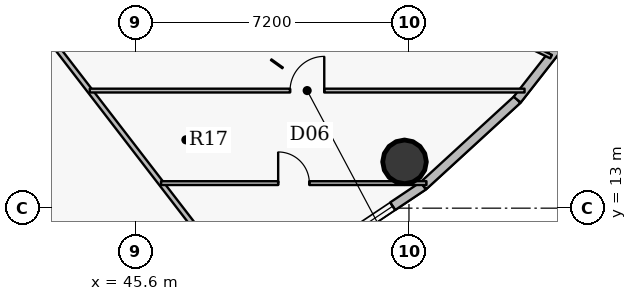
"""IFC4 building model, lengths in metres.
Left out: names, types, materials, properties, quantities, classifications, styles, units other than length and angle.
Written with IfcOpenShell. Run it as: python <this file> out.ifc"""

import sys

from ifc_helpers import new_model, si_unit, direction, frame, frame_2d, origin, origin_2d, place, context, subcontext, project, spatial, rectangle, hollow_circle, extrude, source, transform, mapped, element, fill, save


model = new_model("IFC4")
c1 = context("Model", 3, precision=1e-05, world=origin(), true_north=direction((0.0, 1.0)))
c2 = subcontext(c1, "Body", "Model", "MODEL_VIEW")
j1 = project(units=[si_unit("LENGTHUNIT", "METRE"), si_unit("PLANEANGLEUNIT", "RADIAN")], contexts=[c1])
p1 = place(None, origin())
s1 = spatial("IfcSite", under=j1, at=p1, CompositionType="ELEMENT")
p2 = place(p1, origin())
s2 = spatial("IfcBuilding", under=s1, at=p2, CompositionType="ELEMENT")
p3 = place(p2, frame((0.0, 0.0, 229.05)))
s3 = spatial("IfcBuildingStorey", under=s2, at=p3, CompositionType="ELEMENT", Elevation=229.05)
p4 = place(p3, frame((52.683, 14.219, 0.0), z_axis=(0.0, 0.0, 1.0), x_axis=(1.0, 0.0, 0.0)))
e1 = element("IfcColumn", 1, at=p4, inside=s3, PredefinedType="COLUMN", context=c2, shape_type="SweptSolid", body=[
    extrude(hollow_circle(Radius=0.575, WallThickness=0.036, at=origin_2d()), origin(), (0.0, 0.0, 1.0), 3.75),
])
p5 = place(p3, frame((53.176, 13.589, 0.0), z_axis=(0.0, 0.0, 1.0), x_axis=(-0.831262496074, -0.555880079352, 0.0)))
e2 = element("IfcWall", 2, at=p5, inside=s3, PredefinedType="SOLIDWALL", context=c2, shape_type="SweptSolid", body=[
    extrude(rectangle(XDim=3.484, YDim=0.24, at=frame_2d((1.742, 0.0))), origin(), (0.0, 0.0, 1.0), 3.5),
])
p6 = place(p5, frame((0.968, 0.0, 0.9)))
e3 = element("IfcOpeningElement", 3, at=p6, cuts=e2, PredefinedType="OPENING", context=c2, shape_type="SweptSolid", body=[
    extrude(rectangle(XDim=1.6, YDim=1.75, at=origin_2d()), frame((0.8, 0.13, 0.875), z_axis=(0.0, -1.0, 0.0), x_axis=(1.0, 0.0, 0.0)), (0.0, 0.0, 1.0), 0.26),
])
p7 = place(p3, frame((55.648, 15.855, 0.0), z_axis=(0.0, 0.0, 1.0), x_axis=(-0.737123922599, -0.675757591694, 0.0)))
e4 = element("IfcWall", 4, at=p7, inside=s3, PredefinedType="SOLIDWALL", context=c2, shape_type="SweptSolid", body=[
    extrude(rectangle(XDim=3.354, YDim=0.24, at=frame_2d((1.677, 0.0))), origin(), (0.0, 0.0, 1.0), 3.5),
])
p8 = place(p3, frame((57.636, 18.395, 0.0), z_axis=(0.0, 0.0, 1.0), x_axis=(-0.616312344705, -0.787501805562, 0.0)))
e5 = element("IfcWall", 5, at=p8, inside=s3, PredefinedType="SOLIDWALL", context=c2, shape_type="SweptSolid", body=[
    extrude(rectangle(XDim=3.225, YDim=0.24, at=frame_2d((1.612, 0.0))), origin(), (0.0, 0.0, 1.0), 3.5),
])
p9 = place(p3, frame((42.817, 18.15, 0.0), z_axis=(0.0, 0.0, 1.0), x_axis=(0.610231128601, -0.792223434194, 0.0)))
e6 = element("IfcWall", 6, at=p9, inside=s3, PredefinedType="PARTITIONING", context=c2, shape_type="SweptSolid", body=[
    extrude(rectangle(XDim=9.294, YDim=0.135, at=frame_2d((4.647, 0.0))), origin(), (0.0, 0.0, 1.0), 2.985),
])
p10 = place(p3, frame((44.401, 16.094, 0.0), z_axis=(0.0, 0.0, 1.0), x_axis=(1.0, 0.0, 0.0)))
e7 = element("IfcWall", 7, at=p10, inside=s3, PredefinedType="PARTITIONING", context=c2, shape_type="SweptSolid", body=[
    extrude(rectangle(XDim=11.441, YDim=0.1, at=frame_2d((5.72, 0.0))), origin(), (0.0, 0.0, 1.0), 2.935),
])
p11 = place(p10, frame((5.271, 0.0, 0.0)))
e8 = element("IfcOpeningElement", 8, at=p11, cuts=e7, PredefinedType="OPENING", context=c2, shape_type="SweptSolid", body=[
    extrude(rectangle(XDim=0.9, YDim=2.1, at=origin_2d()), frame((0.45, 0.06, 1.05), z_axis=(0.0, -1.0, 0.0), x_axis=(1.0, 0.0, 0.0)), (0.0, 0.0, 1.0), 0.12),
])
p12 = place(p3, frame((46.276, 13.659, 0.0), z_axis=(0.0, 0.0, 1.0), x_axis=(1.0, 0.0, 0.0)))
e9 = element("IfcWall", 9, at=p12, inside=s3, PredefinedType="PARTITIONING", context=c2, shape_type="SweptSolid", body=[
    extrude(rectangle(XDim=6.984, YDim=0.1, at=frame_2d((3.492, 0.0))), origin(), (0.0, 0.0, 1.0), 2.985),
])
p13 = place(p12, frame((3.082, 0.0, 0.0)))
e10 = element("IfcOpeningElement", 10, at=p13, cuts=e9, PredefinedType="OPENING", context=c2, shape_type="SweptSolid", body=[
    extrude(rectangle(XDim=0.82, YDim=2.1, at=origin_2d()), frame((0.41, 0.06, 1.05), z_axis=(0.0, -1.0, 0.0), x_axis=(1.0, 0.0, 0.0)), (0.0, 0.0, 1.0), 0.12),
])
p14 = place(p3, frame((50.374, 19.993, 0.0), z_axis=(0.0, 0.0, 1.0), x_axis=(0.898866241562, -0.438223093618, 0.0)))
e11 = element("IfcWall", 11, at=p14, inside=s3, PredefinedType="PARTITIONING", context=c2, shape_type="SweptSolid", body=[
    extrude(rectangle(XDim=6.86, YDim=0.1, at=frame_2d((3.43, 0.0))), origin(), (0.0, 0.0, 1.0), 2.985),
])
p15 = place(p14, frame((2.98, 0.0, 0.0)))
e12 = element("IfcOpeningElement", 12, at=p15, cuts=e11, PredefinedType="OPENING", context=c2, shape_type="SweptSolid", body=[
    extrude(rectangle(XDim=0.9, YDim=2.1, at=origin_2d()), frame((0.45, 0.06, 1.05), z_axis=(0.0, -1.0, 0.0), x_axis=(1.0, 0.0, 0.0)), (0.0, 0.0, 1.0), 0.12),
])
m1 = source(origin(), c2, "Body", "SweptSolid", [
    extrude(rectangle(XDim=1.6, YDim=1.75, at=origin_2d()), frame((0.8, 0.03, 0.875), z_axis=(0.0, -1.0, 0.0), x_axis=(1.0, 0.0, 0.0)), (0.0, 0.0, 1.0), 0.06),
])
p16 = place(p6, origin())
e13 = element("IfcWindow", 13, at=p16, inside=s3, PartitioningType="DOUBLE_PANEL_VERTICAL", PredefinedType="WINDOW", context=c2, shape_type="MappedRepresentation", body=[
    mapped(m1, transform((0.0, 0.0, 0.0), x_axis=(1.0, 0.0, 0.0), y_axis=(0.0, 1.0, 0.0), z_axis=(0.0, 0.0, 1.0), scale=1.0)),
])
fill(e3, e13)
m2 = source(origin(), c2, "Body", "SweptSolid", [
    extrude(rectangle(XDim=0.9, YDim=2.1, at=origin_2d()), frame((0.45, 0.025, 1.05), z_axis=(0.0, -1.0, 0.0), x_axis=(1.0, 0.0, 0.0)), (0.0, 0.0, 1.0), 0.05),
])
p17 = place(p11, origin())
e14 = element("IfcDoor", 14, at=p17, inside=s3, OperationType="SINGLE_SWING_RIGHT", PredefinedType="DOOR", context=c2, shape_type="MappedRepresentation", body=[
    mapped(m2, transform((0.0, 0.0, 0.0), x_axis=(1.0, 0.0, 0.0), y_axis=(0.0, 1.0, 0.0), z_axis=(0.0, 0.0, 1.0), scale=1.0)),
])
fill(e8, e14)
m3 = source(origin(), c2, "Body", "SweptSolid", [
    extrude(rectangle(XDim=0.82, YDim=2.1, at=origin_2d()), frame((0.41, 0.025, 1.05), z_axis=(0.0, -1.0, 0.0), x_axis=(1.0, 0.0, 0.0)), (0.0, 0.0, 1.0), 0.05),
])
p18 = place(p13, origin())
e15 = element("IfcDoor", 15, at=p18, inside=s3, OperationType="SINGLE_SWING_LEFT", PredefinedType="DOOR", context=c2, shape_type="MappedRepresentation", body=[
    mapped(m3, transform((0.0, 0.0, 0.0), x_axis=(1.0, 0.0, 0.0), y_axis=(0.0, 1.0, 0.0), z_axis=(0.0, 0.0, 1.0), scale=1.0)),
])
fill(e10, e15)
save(model, sys.argv[1])
